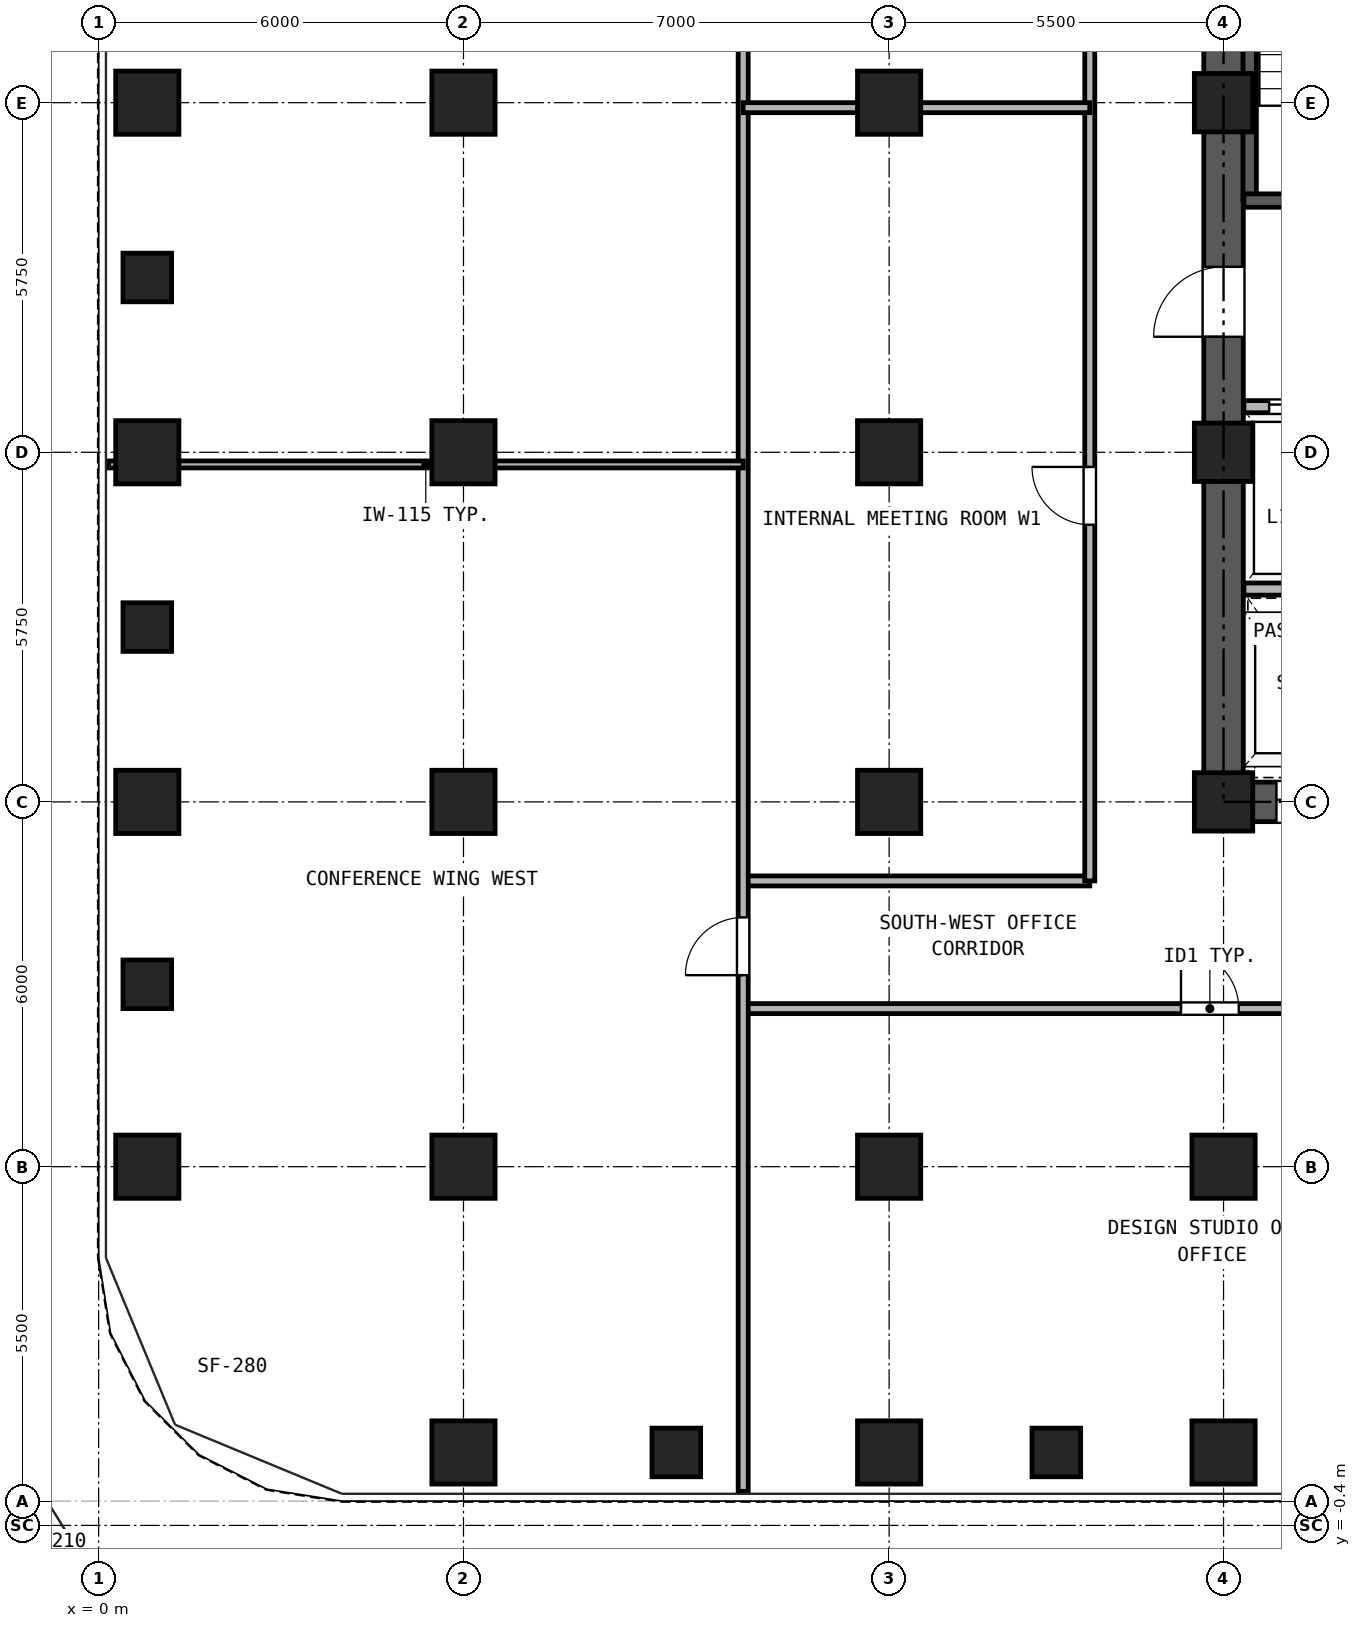
"""IFC4 building model, lengths in metres.
Left out: names, types, materials, properties, quantities, classifications, styles, units other than length and angle.
Written with IfcOpenShell. Run it as: python <this file> out.ifc"""

import sys

from ifc_helpers import new_model, si_unit, direction, frame, frame_2d, origin, origin_2d, place, context, subcontext, project, spatial, rectangle, hollow_rectangle, extrude, source, transform, mapped, element, fill, save


model = new_model("IFC4")
c1 = context("Model", 3, precision=1e-05, world=origin(), true_north=direction((0.0, 1.0)))
c2 = subcontext(c1, "Body", "Model", "MODEL_VIEW")
j1 = project(units=[si_unit("LENGTHUNIT", "METRE"), si_unit("PLANEANGLEUNIT", "RADIAN")], contexts=[c1])
p1 = place(None, origin())
s1 = spatial("IfcSite", under=j1, at=p1, CompositionType="ELEMENT")
p2 = place(p1, origin())
s2 = spatial("IfcBuilding", under=s1, at=p2, CompositionType="ELEMENT")
p3 = place(p2, frame((0.0, 0.0, 47.7)))
s3 = spatial("IfcBuildingStorey", under=s2, at=p3, CompositionType="ELEMENT", Elevation=47.7)
m1 = source(origin(), c2, "Body", "SweptSolid", [
    extrude(hollow_rectangle(XDim=1.04, YDim=1.04, WallThickness=0.065, at=origin_2d()), origin(), (0.0, 0.0, 1.0), 3.32),
])
for number, where, z_axis, x_axis in (
    (1, (6.0, 0.8, 0.0), (0.0, 0.0, 1.0), (1.0, 0.0, 0.0)),
    (2, (13.0, 0.8, 0.0), (0.0, 0.0, 1.0), (1.0, 0.0, 0.0)),
    (3, (18.5, 0.8, 0.0), (0.0, 0.0, 1.0), (1.0, 0.0, 0.0)),
    (4, (0.8, 5.5, 0.0), (0.0, 0.0, 1.0), (1.0, 0.0, 0.0)),
    (5, (0.8, 11.5, 0.0), (0.0, 0.0, 1.0), (1.0, 0.0, 0.0)),
    (6, (0.8, 17.25, 0.0), (0.0, 0.0, 1.0), (1.0, 0.0, 0.0)),
    (7, (0.8, 23.0, 0.0), (0.0, 0.0, 1.0), (1.0, 0.0, 0.0)),
    (8, (6.0, 5.5, 0.0), (0.0, 0.0, 1.0), (1.0, 0.0, 0.0)),
    (9, (6.0, 11.5, 0.0), (0.0, 0.0, 1.0), (1.0, 0.0, 0.0)),
    (10, (6.0, 17.25, 0.0), (0.0, 0.0, 1.0), (1.0, 0.0, 0.0)),
    (11, (6.0, 23.0, 0.0), (0.0, 0.0, 1.0), (1.0, 0.0, 0.0)),
    (12, (13.0, 5.5, 0.0), (0.0, 0.0, 1.0), (1.0, 0.0, 0.0)),
    (13, (13.0, 11.5, 0.0), (0.0, 0.0, 1.0), (1.0, 0.0, 0.0)),
    (14, (13.0, 17.25, 0.0), (0.0, 0.0, 1.0), (1.0, 0.0, 0.0)),
    (15, (13.0, 23.0, 0.0), (0.0, 0.0, 1.0), (1.0, 0.0, 0.0)),
    (16, (18.5, 5.5, 0.0), (0.0, 0.0, 1.0), (1.0, 0.0, 0.0)),
):
    element("IfcColumn", number, at=place(p3, frame(where, z_axis=z_axis, x_axis=x_axis)), inside=s3, PredefinedType="COLUMN", context=c2, shape_type="MappedRepresentation", body=[
        mapped(m1, transform((0.0, 0.0, 0.0), x_axis=(1.0, 0.0, 0.0), y_axis=(0.0, 1.0, 0.0), z_axis=(0.0, 0.0, 1.0), scale=1.0)),
    ])
m2 = source(origin(), c2, "Body", "SweptSolid", [
    extrude(hollow_rectangle(XDim=0.96, YDim=0.96, WallThickness=0.06, at=origin_2d()), origin(), (0.0, 0.0, 1.0), 3.32),
])
for number, where, z_axis, x_axis in (
    (17, (18.5, 11.5, 0.0), (0.0, 0.0, 1.0), (1.0, 0.0, 0.0)),
    (18, (18.5, 17.25, 0.0), (0.0, 0.0, 1.0), (1.0, 0.0, 0.0)),
    (19, (18.5, 23.0, 0.0), (0.0, 0.0, 1.0), (1.0, 0.0, 0.0)),
):
    element("IfcColumn", number, at=place(p3, frame(where, z_axis=z_axis, x_axis=x_axis)), inside=s3, PredefinedType="COLUMN", context=c2, shape_type="MappedRepresentation", body=[
        mapped(m2, transform((0.0, 0.0, 0.0), x_axis=(1.0, 0.0, 0.0), y_axis=(0.0, 1.0, 0.0), z_axis=(0.0, 0.0, 1.0), scale=1.0)),
    ])
m3 = source(origin(), c2, "Body", "SweptSolid", [
    extrude(hollow_rectangle(XDim=0.8, YDim=0.8, WallThickness=0.045, at=origin_2d()), origin(), (0.0, 0.0, 1.0), 3.32),
])
for number, where, z_axis, x_axis in (
    (20, (9.5, 0.8, 0.0), (0.0, 0.0, 1.0), (1.0, 0.0, 0.0)),
    (21, (15.75, 0.8, 0.0), (0.0, 0.0, 1.0), (1.0, 0.0, 0.0)),
    (22, (0.8, 8.5, 0.0), (0.0, 0.0, 1.0), (1.0, 0.0, 0.0)),
    (23, (0.8, 14.375, 0.0), (0.0, 0.0, 1.0), (1.0, 0.0, 0.0)),
    (24, (0.8, 20.125, 0.0), (0.0, 0.0, 1.0), (1.0, 0.0, 0.0)),
):
    element("IfcColumn", number, at=place(p3, frame(where, z_axis=z_axis, x_axis=x_axis)), inside=s3, PredefinedType="COLUMN", context=c2, shape_type="MappedRepresentation", body=[
        mapped(m3, transform((0.0, 0.0, 0.0), x_axis=(1.0, 0.0, 0.0), y_axis=(0.0, 1.0, 0.0), z_axis=(0.0, 0.0, 1.0), scale=1.0)),
    ])
p4 = place(p3, frame((18.175, 11.5, 0.0), z_axis=(0.0, 0.0, 1.0), x_axis=(1.0, 0.0, 0.0)))
e25 = element("IfcWall", 25, at=p4, inside=s3, PredefinedType="SHEAR", context=c2, shape_type="SweptSolid", body=[
    extrude(rectangle(XDim=10.65, YDim=0.65, at=frame_2d((5.325, 0.0))), origin(), (0.0, 0.0, 1.0), 3.32),
])
p5 = place(p4, frame((1.195, 0.0, 0.0)))
e26 = element("IfcOpeningElement", 26, at=p5, cuts=e25, PredefinedType="OPENING", context=c2, shape_type="SweptSolid", body=[
    extrude(rectangle(XDim=1.1, YDim=2.25, at=frame_2d((0.55, 1.125))), frame((0.0, 0.335, 0.0), z_axis=(0.0, -1.0, 0.0), x_axis=(1.0, 0.0, 0.0)), (0.0, 0.0, 1.0), 0.67),
])
p6 = place(p4, frame((3.495, 0.0, 0.0)))
e27 = element("IfcOpeningElement", 27, at=p6, cuts=e25, PredefinedType="OPENING", context=c2, shape_type="SweptSolid", body=[
    extrude(rectangle(XDim=1.1, YDim=2.25, at=frame_2d((0.55, 1.125))), frame((0.0, 0.335, 0.0), z_axis=(0.0, -1.0, 0.0), x_axis=(1.0, 0.0, 0.0)), (0.0, 0.0, 1.0), 0.67),
])
p7 = place(p4, frame((5.925, 0.0, 0.0)))
e28 = element("IfcOpeningElement", 28, at=p7, cuts=e25, PredefinedType="OPENING", context=c2, shape_type="SweptSolid", body=[
    extrude(rectangle(XDim=1.1, YDim=2.25, at=frame_2d((0.55, 1.125))), frame((0.0, 0.335, 0.0), z_axis=(0.0, -1.0, 0.0), x_axis=(1.0, 0.0, 0.0)), (0.0, 0.0, 1.0), 0.67),
])
p8 = place(p4, frame((8.325, 0.0, 0.0)))
e29 = element("IfcOpeningElement", 29, at=p8, cuts=e25, PredefinedType="OPENING", context=c2, shape_type="SweptSolid", body=[
    extrude(rectangle(XDim=1.1, YDim=2.25, at=frame_2d((0.55, 1.125))), frame((0.0, 0.335, 0.0), z_axis=(0.0, -1.0, 0.0), x_axis=(1.0, 0.0, 0.0)), (0.0, 0.0, 1.0), 0.67),
])
p9 = place(p3, frame((18.5, 11.825, 0.0), z_axis=(0.0, 0.0, 1.0), x_axis=(0.0, 1.0, 0.0)))
e30 = element("IfcWall", 30, at=p9, inside=s3, PredefinedType="SHEAR", context=c2, shape_type="SweptSolid", body=[
    extrude(rectangle(XDim=16.6, YDim=0.65, at=frame_2d((8.3, 0.0))), origin(), (0.0, 0.0, 1.0), 3.32),
])
p10 = place(p9, frame((7.325, 0.0, 0.0)))
e31 = element("IfcOpeningElement", 31, at=p10, cuts=e30, PredefinedType="OPENING", context=c2, shape_type="SweptSolid", body=[
    extrude(rectangle(XDim=1.15, YDim=2.2, at=frame_2d((0.575, 1.1))), frame((0.0, 0.335, 0.0), z_axis=(0.0, -1.0, 0.0), x_axis=(1.0, 0.0, 0.0)), (0.0, 0.0, 1.0), 0.67),
])
p11 = place(p3, frame((18.93, 21.39, 0.0), z_axis=(0.0, 0.0, 1.0), x_axis=(0.0, 1.0, 0.0)))
e32 = element("IfcWall", 32, at=p11, inside=s3, PredefinedType="SOLIDWALL", context=c2, shape_type="SweptSolid", body=[
    extrude(rectangle(XDim=7.11, YDim=0.22, at=frame_2d((3.555, 0.0))), origin(), (0.0, 0.0, 1.0), 3.32),
])
p12 = place(p3, frame((18.835, 21.39, 0.0), z_axis=(0.0, 0.0, 1.0), x_axis=(1.0, 0.0, 0.0)))
e33 = element("IfcWall", 33, at=p12, inside=s3, PredefinedType="SOLIDWALL", context=c2, shape_type="SweptSolid", body=[
    extrude(rectangle(XDim=6.295, YDim=0.22, at=frame_2d((3.147, 0.0))), origin(), (0.0, 0.0, 1.0), 3.32),
])
p13 = place(p12, frame((1.015, 0.0, 0.0)))
e34 = element("IfcOpeningElement", 34, at=p13, cuts=e33, PredefinedType="OPENING", context=c2, shape_type="SweptSolid", body=[
    extrude(rectangle(XDim=1.15, YDim=2.2, at=frame_2d((0.575, 1.1))), frame((0.0, 0.12, 0.0), z_axis=(0.0, -1.0, 0.0), x_axis=(1.0, 0.0, 0.0)), (0.0, 0.0, 1.0), 0.24),
])
p14 = place(p12, frame((4.745, 0.0, 0.0)))
e35 = element("IfcOpeningElement", 35, at=p14, cuts=e33, PredefinedType="OPENING", context=c2, shape_type="SweptSolid", body=[
    extrude(rectangle(XDim=1.1, YDim=2.25, at=frame_2d((0.55, 1.125))), frame((0.0, 0.12, 0.0), z_axis=(0.0, -1.0, 0.0), x_axis=(1.0, 0.0, 0.0)), (0.0, 0.0, 1.0), 0.24),
])
p15 = place(p3, frame((18.835, 18.0, 0.0), z_axis=(0.0, 0.0, 1.0), x_axis=(1.0, 0.0, 0.0)))
e36 = element("IfcWall", 36, at=p15, inside=s3, PredefinedType="PARTITIONING", context=c2, shape_type="SweptSolid", body=[
    extrude(rectangle(XDim=9.33, YDim=0.2, at=frame_2d((4.665, 0.0))), origin(), (0.0, 0.0, 1.0), 3.32),
])
p16 = place(p15, frame((0.415, 0.0, 0.0)))
e37 = element("IfcOpeningElement", 37, at=p16, cuts=e36, PredefinedType="OPENING", context=c2, shape_type="SweptSolid", body=[
    extrude(rectangle(XDim=1.3, YDim=2.3, at=frame_2d((0.65, 1.15))), frame((0.0, 0.11, 0.0), z_axis=(0.0, -1.0, 0.0), x_axis=(1.0, 0.0, 0.0)), (0.0, 0.0, 1.0), 0.22),
])
p17 = place(p15, frame((2.515, 0.0, 0.0)))
e38 = element("IfcOpeningElement", 38, at=p17, cuts=e36, PredefinedType="OPENING", context=c2, shape_type="SweptSolid", body=[
    extrude(rectangle(XDim=1.3, YDim=2.3, at=frame_2d((0.65, 1.15))), frame((0.0, 0.11, 0.0), z_axis=(0.0, -1.0, 0.0), x_axis=(1.0, 0.0, 0.0)), (0.0, 0.0, 1.0), 0.22),
])
p18 = place(p15, frame((4.935, 0.0, 0.0)))
e39 = element("IfcOpeningElement", 39, at=p18, cuts=e36, PredefinedType="OPENING", context=c2, shape_type="SweptSolid", body=[
    extrude(rectangle(XDim=0.9, YDim=2.05, at=frame_2d((0.45, 1.025))), frame((0.0, 0.11, 0.0), z_axis=(0.0, -1.0, 0.0), x_axis=(1.0, 0.0, 0.0)), (0.0, 0.0, 1.0), 0.22),
])
p19 = place(p15, frame((8.065, 0.0, 0.0)))
e40 = element("IfcOpeningElement", 40, at=p19, cuts=e36, PredefinedType="OPENING", context=c2, shape_type="SweptSolid", body=[
    extrude(rectangle(XDim=0.9, YDim=2.05, at=frame_2d((0.45, 1.025))), frame((0.0, 0.11, 0.0), z_axis=(0.0, -1.0, 0.0), x_axis=(1.0, 0.0, 0.0)), (0.0, 0.0, 1.0), 0.22),
])
p20 = place(p3, frame((18.835, 15.0, 0.0), z_axis=(0.0, 0.0, 1.0), x_axis=(1.0, 0.0, 0.0)))
e41 = element("IfcWall", 41, at=p20, inside=s3, PredefinedType="PARTITIONING", context=c2, shape_type="SweptSolid", body=[
    extrude(rectangle(XDim=9.33, YDim=0.2, at=frame_2d((4.665, 0.0))), origin(), (0.0, 0.0, 1.0), 3.32),
])
p21 = place(p3, frame((10.6, 8.1, 0.0), z_axis=(0.0, 0.0, 1.0), x_axis=(1.0, 0.0, 0.0)))
e42 = element("IfcWall", 42, at=p21, inside=s3, PredefinedType="PARTITIONING", context=c2, shape_type="SweptSolid", body=[
    extrude(rectangle(XDim=25.8, YDim=0.165, at=frame_2d((12.9, 0.0))), origin(), (0.0, 0.0, 1.0), 3.32),
])
p22 = place(p21, frame((7.2, 0.0, 0.0)))
e43 = element("IfcOpeningElement", 43, at=p22, cuts=e42, PredefinedType="OPENING", context=c2, shape_type="SweptSolid", body=[
    extrude(rectangle(XDim=0.95, YDim=2.15, at=frame_2d((0.475, 1.075))), frame((0.0, 0.093, 0.0), z_axis=(0.0, -1.0, 0.0), x_axis=(1.0, 0.0, 0.0)), (0.0, 0.0, 1.0), 0.185),
])
p23 = place(p21, frame((17.65, 0.0, 0.0)))
e44 = element("IfcOpeningElement", 44, at=p23, cuts=e42, PredefinedType="OPENING", context=c2, shape_type="SweptSolid", body=[
    extrude(rectangle(XDim=0.95, YDim=2.15, at=frame_2d((0.475, 1.075))), frame((0.0, 0.093, 0.0), z_axis=(0.0, -1.0, 0.0), x_axis=(1.0, 0.0, 0.0)), (0.0, 0.0, 1.0), 0.185),
])
p24 = place(p21, frame((21.75, 0.0, 0.0)))
e45 = element("IfcOpeningElement", 45, at=p24, cuts=e42, PredefinedType="OPENING", context=c2, shape_type="SweptSolid", body=[
    extrude(rectangle(XDim=0.95, YDim=2.15, at=frame_2d((0.475, 1.075))), frame((0.0, 0.093, 0.0), z_axis=(0.0, -1.0, 0.0), x_axis=(1.0, 0.0, 0.0)), (0.0, 0.0, 1.0), 0.185),
])
p25 = place(p21, frame((24.2, 0.0, 0.0)))
e46 = element("IfcOpeningElement", 46, at=p25, cuts=e42, PredefinedType="OPENING", context=c2, shape_type="SweptSolid", body=[
    extrude(rectangle(XDim=0.92, YDim=2.1, at=frame_2d((0.46, 1.05))), frame((0.0, 0.093, 0.0), z_axis=(0.0, -1.0, 0.0), x_axis=(1.0, 0.0, 0.0)), (0.0, 0.0, 1.0), 0.185),
])
p26 = place(p3, frame((10.6, 10.2, 0.0), z_axis=(0.0, 0.0, 1.0), x_axis=(1.0, 0.0, 0.0)))
e47 = element("IfcWall", 47, at=p26, inside=s3, PredefinedType="PARTITIONING", context=c2, shape_type="SweptSolid", body=[
    extrude(rectangle(XDim=5.7, YDim=0.165, at=frame_2d((2.85, 0.0))), origin(), (0.0, 0.0, 1.0), 3.32),
])
p27 = place(p3, frame((16.3, 10.2, 0.0), z_axis=(0.0, 0.0, 1.0), x_axis=(0.0, 1.0, 0.0)))
e48 = element("IfcWall", 48, at=p27, inside=s3, PredefinedType="PARTITIONING", context=c2, shape_type="SweptSolid", body=[
    extrude(rectangle(XDim=19.7, YDim=0.165, at=frame_2d((9.85, 0.0))), origin(), (0.0, 0.0, 1.0), 3.32),
])
p28 = place(p27, frame((5.859, 0.0, 0.0)))
e49 = element("IfcOpeningElement", 49, at=p28, cuts=e48, PredefinedType="OPENING", context=c2, shape_type="SweptSolid", body=[
    extrude(rectangle(XDim=0.95, YDim=2.15, at=frame_2d((0.475, 1.075))), frame((0.0, 0.093, 0.0), z_axis=(0.0, -1.0, 0.0), x_axis=(1.0, 0.0, 0.0)), (0.0, 0.0, 1.0), 0.185),
])
p29 = place(p27, frame((15.709, 0.0, 0.0)))
e50 = element("IfcOpeningElement", 50, at=p29, cuts=e48, PredefinedType="OPENING", context=c2, shape_type="SweptSolid", body=[
    extrude(rectangle(XDim=0.95, YDim=2.15, at=frame_2d((0.475, 1.075))), frame((0.0, 0.093, 0.0), z_axis=(0.0, -1.0, 0.0), x_axis=(1.0, 0.0, 0.0)), (0.0, 0.0, 1.0), 0.185),
])
p30 = place(p3, frame((10.6, 0.16, 0.0), z_axis=(0.0, 0.0, 1.0), x_axis=(0.0, 1.0, 0.0)))
e51 = element("IfcWall", 51, at=p30, inside=s3, PredefinedType="PARTITIONING", context=c2, shape_type="SweptSolid", body=[
    extrude(rectangle(XDim=40.18, YDim=0.165, at=frame_2d((20.09, 0.0))), origin(), (0.0, 0.0, 1.0), 3.32),
])
p31 = place(p30, frame((8.49, 0.0, 0.0)))
e52 = element("IfcOpeningElement", 52, at=p31, cuts=e51, PredefinedType="OPENING", context=c2, shape_type="SweptSolid", body=[
    extrude(rectangle(XDim=0.95, YDim=2.15, at=frame_2d((0.475, 1.075))), frame((0.0, 0.093, 0.0), z_axis=(0.0, -1.0, 0.0), x_axis=(1.0, 0.0, 0.0)), (0.0, 0.0, 1.0), 0.185),
])
p32 = place(p30, frame((30.29, 0.0, 0.0)))
e53 = element("IfcOpeningElement", 53, at=p32, cuts=e51, PredefinedType="OPENING", context=c2, shape_type="SweptSolid", body=[
    extrude(rectangle(XDim=0.95, YDim=2.15, at=frame_2d((0.475, 1.075))), frame((0.0, 0.093, 0.0), z_axis=(0.0, -1.0, 0.0), x_axis=(1.0, 0.0, 0.0)), (0.0, 0.0, 1.0), 0.185),
])
p33 = place(p3, frame((0.16, 17.05, 0.0), z_axis=(0.0, 0.0, 1.0), x_axis=(1.0, 0.0, 0.0)))
e54 = element("IfcWall", 54, at=p33, inside=s3, PredefinedType="PARTITIONING", context=c2, shape_type="SweptSolid", body=[
    extrude(rectangle(XDim=10.44, YDim=0.115, at=frame_2d((5.22, 0.0))), origin(), (0.0, 0.0, 1.0), 2.539),
])
p34 = place(p3, frame((10.6, 22.918, 0.0), z_axis=(0.0, 0.0, 1.0), x_axis=(1.0, 0.0, 0.0)))
e55 = element("IfcWall", 55, at=p34, inside=s3, PredefinedType="PARTITIONING", context=c2, shape_type="SweptSolid", body=[
    extrude(rectangle(XDim=5.7, YDim=0.165, at=frame_2d((2.85, 0.0))), origin(), (0.0, 0.0, 1.0), 2.539),
])
p35 = place(p16, origin())
e56 = element("IfcDoor", 56, at=p35, inside=s3, OperationType="DOUBLE_DOOR_SLIDING", PredefinedType="DOOR", context=c2, shape_type="SweptSolid", body=[
    extrude(rectangle(XDim=1.3, YDim=2.3, at=frame_2d((0.65, 1.15))), frame((0.0, 0.025, 0.0), z_axis=(0.0, -1.0, 0.0), x_axis=(1.0, 0.0, 0.0)), (0.0, 0.0, 1.0), 0.05),
])
fill(e37, e56)
p36 = place(p10, frame((1.15, 0.0, 0.0), z_axis=(0.0, 0.0, 1.0), x_axis=(-1.0, 0.0, 0.0)))
e57 = element("IfcDoor", 57, at=p36, inside=s3, OperationType="SINGLE_SWING_LEFT", PredefinedType="DOOR", context=c2, shape_type="SweptSolid", body=[
    extrude(rectangle(XDim=1.15, YDim=2.2, at=frame_2d((0.575, 1.1))), frame((0.0, 0.025, 0.0), z_axis=(0.0, -1.0, 0.0), x_axis=(1.0, 0.0, 0.0)), (0.0, 0.0, 1.0), 0.05),
])
fill(e31, e57)
p37 = place(p5, frame((1.1, 0.0, 0.0), z_axis=(0.0, 0.0, 1.0), x_axis=(-1.0, 0.0, 0.0)))
e58 = element("IfcDoor", 58, at=p37, inside=s3, OperationType="DOUBLE_DOOR_SLIDING", PredefinedType="DOOR", context=c2, shape_type="SweptSolid", body=[
    extrude(rectangle(XDim=1.1, YDim=2.25, at=frame_2d((0.55, 1.125))), frame((0.0, 0.025, 0.0), z_axis=(0.0, -1.0, 0.0), x_axis=(1.0, 0.0, 0.0)), (0.0, 0.0, 1.0), 0.05),
])
fill(e26, e58)
p38 = place(p22, frame((0.95, 0.0, 0.0), z_axis=(0.0, 0.0, 1.0), x_axis=(-1.0, 0.0, 0.0)))
e59 = element("IfcDoor", 59, at=p38, inside=s3, OperationType="SINGLE_SWING_LEFT", PredefinedType="DOOR", context=c2, shape_type="SweptSolid", body=[
    extrude(rectangle(XDim=0.95, YDim=2.15, at=frame_2d((0.475, 1.075))), frame((0.0, 0.025, 0.0), z_axis=(0.0, -1.0, 0.0), x_axis=(1.0, 0.0, 0.0)), (0.0, 0.0, 1.0), 0.05),
])
fill(e43, e59)
p39 = place(p31, frame((0.95, 0.0, 0.0), z_axis=(0.0, 0.0, 1.0), x_axis=(-1.0, 0.0, 0.0)))
e60 = element("IfcDoor", 60, at=p39, inside=s3, OperationType="SINGLE_SWING_LEFT", PredefinedType="DOOR", context=c2, shape_type="SweptSolid", body=[
    extrude(rectangle(XDim=0.95, YDim=2.15, at=frame_2d((0.475, 1.075))), frame((0.0, 0.025, 0.0), z_axis=(0.0, -1.0, 0.0), x_axis=(1.0, 0.0, 0.0)), (0.0, 0.0, 1.0), 0.05),
])
fill(e52, e60)
p40 = place(p28, frame((0.95, 0.0, 0.0), z_axis=(0.0, 0.0, 1.0), x_axis=(-1.0, 0.0, 0.0)))
e61 = element("IfcDoor", 61, at=p40, inside=s3, OperationType="SINGLE_SWING_RIGHT", PredefinedType="DOOR", context=c2, shape_type="SweptSolid", body=[
    extrude(rectangle(XDim=0.95, YDim=2.15, at=frame_2d((0.475, 1.075))), frame((0.0, 0.025, 0.0), z_axis=(0.0, -1.0, 0.0), x_axis=(1.0, 0.0, 0.0)), (0.0, 0.0, 1.0), 0.05),
])
fill(e49, e61)
save(model, sys.argv[1])
